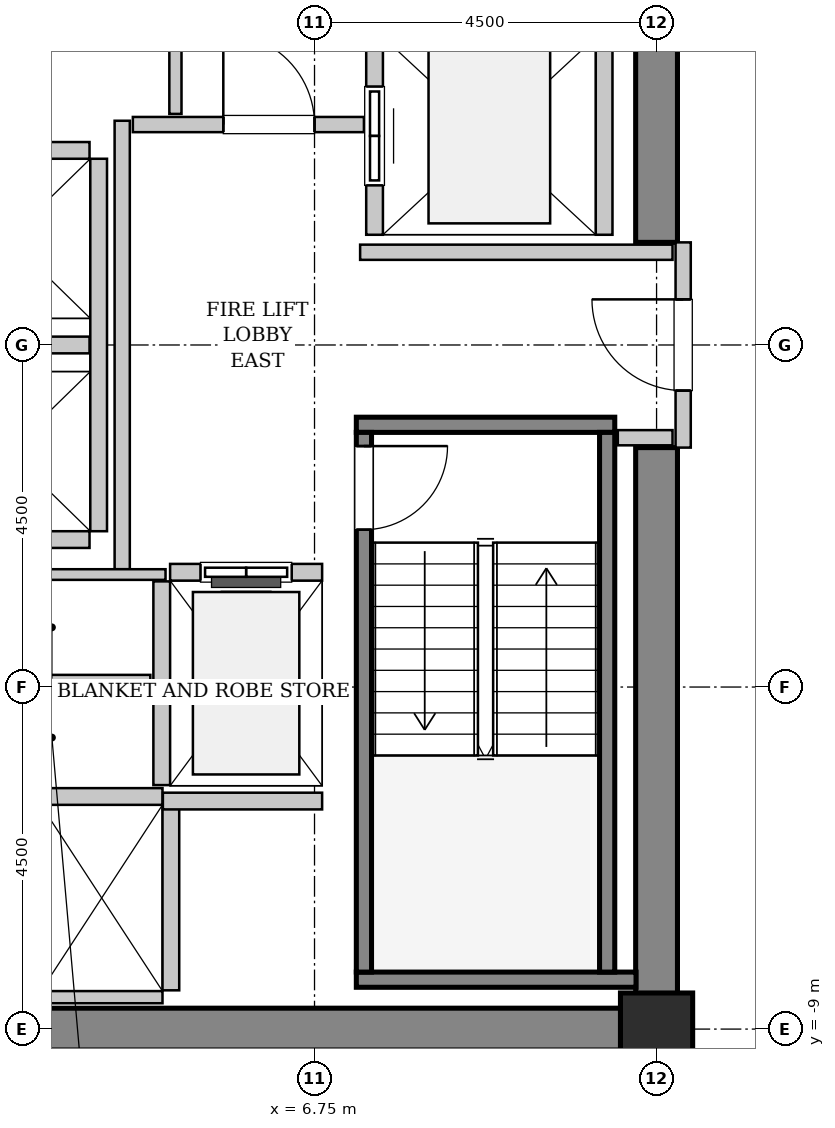
"""IFC4 building model, lengths in metres.
Left out: names, types, materials, properties, quantities, classifications, styles, units other than length and angle.
Written with IfcOpenShell. Run it as: python <this file> out.ifc"""

import sys

from ifc_helpers import new_model, si_unit, direction, frame, frame_2d, origin, origin_2d, place, context, subcontext, project, spatial, rectangle, hollow_rectangle, extrude, source, transform, mapped, element, fill, save


model = new_model("IFC4")
c1 = context("Model", 3, precision=1e-05, world=origin(), true_north=direction((0.0, 1.0)))
c2 = subcontext(c1, "Body", "Model", "MODEL_VIEW")
j1 = project(units=[si_unit("LENGTHUNIT", "METRE"), si_unit("PLANEANGLEUNIT", "RADIAN")], contexts=[c1])
p1 = place(None, origin())
s1 = spatial("IfcSite", under=j1, at=p1, CompositionType="ELEMENT")
p2 = place(p1, origin())
s2 = spatial("IfcBuilding", under=s1, at=p2, CompositionType="ELEMENT")
p3 = place(p2, frame((0.0, 0.0, 109.8)))
s3 = spatial("IfcBuildingStorey", under=s2, at=p3, CompositionType="ELEMENT", Elevation=109.8)
m1 = source(origin(), c2, "Body", "SweptSolid", [
    extrude(rectangle(XDim=9.975, YDim=0.55, at=frame_2d((4.987, 0.0))), origin(), (0.0, 0.0, 1.0), 3.8),
])
p4 = place(p3, frame((1.55, -9.0, 0.0), z_axis=(0.0, 0.0, 1.0), x_axis=(1.0, 0.0, 0.0)))
e1 = element("IfcWall", 1, at=p4, inside=s3, PredefinedType="SHEAR", context=c2, shape_type="MappedRepresentation", body=[
    mapped(m1, transform((0.0, 0.0, 0.0), x_axis=(1.0, 0.0, 0.0), y_axis=(0.0, 1.0, 0.0), z_axis=(0.0, 0.0, 1.0), scale=1.0)),
])
m2 = source(origin(), c2, "Body", "SweptSolid", [
    extrude(rectangle(XDim=7.375, YDim=0.55, at=frame_2d((3.688, 0.0))), origin(), (0.0, 0.0, 1.0), 3.8),
])
for number, where, z_axis, x_axis in (
    (2, (11.25, -8.725, 0.0), (0.0, 0.0, 1.0), (0.0, 1.0, 0.0)),
    (3, (11.25, 1.35, 0.0), (0.0, 0.0, 1.0), (0.0, 1.0, 0.0)),
):
    element("IfcWall", number, at=place(p3, frame(where, z_axis=z_axis, x_axis=x_axis)), inside=s3, PredefinedType="SHEAR", context=c2, shape_type="MappedRepresentation", body=[
        mapped(m2, transform((0.0, 0.0, 0.0), x_axis=(1.0, 0.0, 0.0), y_axis=(0.0, 1.0, 0.0), z_axis=(0.0, 0.0, 1.0), scale=1.0)),
    ])
m3 = source(origin(), c2, "Body", "SweptSolid", [
    extrude(hollow_rectangle(XDim=0.95, YDim=0.95, WallThickness=0.045, InnerFilletRadius=0.045, OuterFilletRadius=0.09, at=origin_2d()), origin(), (0.0, 0.0, 1.0), 3.8),
])
p5 = place(p3, frame((11.25, -9.0, 0.0), z_axis=(0.0, 0.0, 1.0), x_axis=(1.0, 0.0, 0.0)))
e4 = element("IfcColumn", 4, at=p5, inside=s3, PredefinedType="COLUMN", context=c2, shape_type="MappedRepresentation", body=[
    mapped(m3, transform((0.0, 0.0, 0.0), x_axis=(1.0, 0.0, 0.0), y_axis=(0.0, 1.0, 0.0), z_axis=(0.0, 0.0, 1.0), scale=1.0)),
])
m4 = source(origin(), c2, "Body", "SweptSolid", [
    extrude(rectangle(XDim=3.4, YDim=0.2, at=frame_2d((1.7, 0.0))), origin(), (0.0, 0.0, 1.0), 3.8),
])
p6 = place(p3, frame((7.3, -1.05, 0.0), z_axis=(0.0, 0.0, 1.0), x_axis=(1.0, 0.0, 0.0)))
e5 = element("IfcWall", 5, at=p6, inside=s3, PredefinedType="SOLIDWALL", context=c2, shape_type="MappedRepresentation", body=[
    mapped(m4, transform((0.0, 0.0, 0.0), x_axis=(1.0, 0.0, 0.0), y_axis=(0.0, 1.0, 0.0), z_axis=(0.0, 0.0, 1.0), scale=1.0)),
])
m5 = source(origin(), c2, "Body", "SweptSolid", [
    extrude(rectangle(XDim=3.68, YDim=0.2, at=frame_2d((1.84, 0.0))), origin(), (0.0, 0.0, 1.0), 3.8),
])
p7 = place(p3, frame((7.3, -8.35, 0.0), z_axis=(0.0, 0.0, 1.0), x_axis=(1.0, 0.0, 0.0)))
e6 = element("IfcWall", 6, at=p7, inside=s3, PredefinedType="SOLIDWALL", context=c2, shape_type="MappedRepresentation", body=[
    mapped(m5, transform((0.0, 0.0, 0.0), x_axis=(1.0, 0.0, 0.0), y_axis=(0.0, 1.0, 0.0), z_axis=(0.0, 0.0, 1.0), scale=1.0)),
])
m6 = source(origin(), c2, "Body", "SweptSolid", [
    extrude(rectangle(XDim=7.1, YDim=0.2, at=frame_2d((3.55, 0.0))), origin(), (0.0, 0.0, 1.0), 3.8),
])
p8 = place(p3, frame((7.4, -1.15, 0.0), z_axis=(0.0, 0.0, 1.0), x_axis=(0.0, -1.0, 0.0)))
e7 = element("IfcWall", 7, at=p8, inside=s3, PredefinedType="SOLIDWALL", context=c2, shape_type="MappedRepresentation", body=[
    mapped(m6, transform((0.0, 0.0, 0.0), x_axis=(1.0, 0.0, 0.0), y_axis=(0.0, 1.0, 0.0), z_axis=(0.0, 0.0, 1.0), scale=1.0)),
])
p9 = place(p8, frame((0.18, 0.0, 0.0)))
e8 = element("IfcOpeningElement", 8, at=p9, cuts=e7, PredefinedType="OPENING", context=c2, shape_type="SweptSolid", body=[
    extrude(rectangle(XDim=1.1, YDim=2.15, at=frame_2d((0.55, 1.075))), frame((0.0, 0.11, 0.0), z_axis=(0.0, -1.0, 0.0), x_axis=(1.0, 0.0, 0.0)), (0.0, 0.0, 1.0), 0.22),
])
p10 = place(p3, frame((10.6, -1.15, 0.0), z_axis=(0.0, 0.0, 1.0), x_axis=(0.0, -1.0, 0.0)))
e9 = element("IfcWall", 9, at=p10, inside=s3, PredefinedType="SOLIDWALL", context=c2, shape_type="MappedRepresentation", body=[
    mapped(m6, transform((0.0, 0.0, 0.0), x_axis=(1.0, 0.0, 0.0), y_axis=(0.0, 1.0, 0.0), z_axis=(0.0, 0.0, 1.0), scale=1.0)),
])
m7 = source(origin(), c2, "Body", "SweptSolid", [
    extrude(rectangle(XDim=2.0, YDim=0.22, at=frame_2d((1.0, 0.0))), origin(), (0.0, 0.0, 1.0), 3.535),
])
p11 = place(p3, frame((6.85, -2.99, 0.0), z_axis=(0.0, 0.0, 1.0), x_axis=(-1.0, 0.0, 0.0)))
e10 = element("IfcWall", 10, at=p11, inside=s3, PredefinedType="SOLIDWALL", context=c2, shape_type="MappedRepresentation", body=[
    mapped(m7, transform((0.0, 0.0, 0.0), x_axis=(1.0, 0.0, 0.0), y_axis=(0.0, 1.0, 0.0), z_axis=(0.0, 0.0, 1.0), scale=1.0)),
])
p12 = place(p11, frame((0.4, 0.0, 0.0)))
e11 = element("IfcOpeningElement", 11, at=p12, cuts=e10, PredefinedType="OPENING", context=c2, shape_type="SweptSolid", body=[
    extrude(rectangle(XDim=1.2, YDim=2.2, at=frame_2d((0.6, 1.1))), frame((0.0, 0.12, 0.0), z_axis=(0.0, -1.0, 0.0), x_axis=(1.0, 0.0, 0.0)), (0.0, 0.0, 1.0), 0.24),
])
m8 = source(origin(), c2, "Body", "SweptSolid", [
    extrude(rectangle(XDim=2.68, YDim=0.22, at=frame_2d((1.34, 0.0))), origin(), (0.0, 0.0, 1.0), 3.535),
])
p13 = place(p3, frame((4.74, -3.11, 0.0), z_axis=(0.0, 0.0, 1.0), x_axis=(0.0, -1.0, 0.0)))
e12 = element("IfcWall", 12, at=p13, inside=s3, PredefinedType="SOLIDWALL", context=c2, shape_type="MappedRepresentation", body=[
    mapped(m8, transform((0.0, 0.0, 0.0), x_axis=(1.0, 0.0, 0.0), y_axis=(0.0, 1.0, 0.0), z_axis=(0.0, 0.0, 1.0), scale=1.0)),
])
m9 = source(origin(), c2, "Body", "SweptSolid", [
    extrude(rectangle(XDim=5.45, YDim=0.22, at=frame_2d((2.725, 0.0))), origin(), (0.0, 0.0, 1.0), 3.535),
])
p14 = place(p3, frame((7.54, 6.9, 0.0), z_axis=(0.0, 0.0, 1.0), x_axis=(0.0, -1.0, 0.0)))
e13 = element("IfcWall", 13, at=p14, inside=s3, PredefinedType="SOLIDWALL", context=c2, shape_type="MappedRepresentation", body=[
    mapped(m9, transform((0.0, 0.0, 0.0), x_axis=(1.0, 0.0, 0.0), y_axis=(0.0, 1.0, 0.0), z_axis=(0.0, 0.0, 1.0), scale=1.0)),
])
p15 = place(p14, frame((3.5, 0.0, 0.0)))
e14 = element("IfcOpeningElement", 14, at=p15, cuts=e13, PredefinedType="OPENING", context=c2, shape_type="SweptSolid", body=[
    extrude(rectangle(XDim=1.3, YDim=2.3, at=frame_2d((0.65, 1.15))), frame((0.0, 0.12, 0.0), z_axis=(0.0, -1.0, 0.0), x_axis=(1.0, 0.0, 0.0)), (0.0, 0.0, 1.0), 0.24),
])
p16 = place(p14, frame((0.65, 0.0, 0.0)))
e15 = element("IfcOpeningElement", 15, at=p16, cuts=e13, PredefinedType="OPENING", context=c2, shape_type="SweptSolid", body=[
    extrude(rectangle(XDim=1.3, YDim=2.3, at=frame_2d((0.65, 1.15))), frame((0.0, 0.12, 0.0), z_axis=(0.0, -1.0, 0.0), x_axis=(1.0, 0.0, 0.0)), (0.0, 0.0, 1.0), 0.24),
])
p17 = place(p3, frame((10.56, 1.45, 0.0), z_axis=(0.0, 0.0, 1.0), x_axis=(0.0, 1.0, 0.0)))
e16 = element("IfcWall", 16, at=p17, inside=s3, PredefinedType="SOLIDWALL", context=c2, shape_type="MappedRepresentation", body=[
    mapped(m9, transform((0.0, 0.0, 0.0), x_axis=(1.0, 0.0, 0.0), y_axis=(0.0, 1.0, 0.0), z_axis=(0.0, 0.0, 1.0), scale=1.0)),
])
m10 = source(origin(), c2, "Body", "SweptSolid", [
    extrude(rectangle(XDim=3.2, YDim=0.22, at=frame_2d((1.6, 0.0))), origin(), (0.0, 0.0, 1.0), 3.535),
])
p18 = place(p3, frame((4.75, -5.94, 0.0), z_axis=(0.0, 0.0, 1.0), x_axis=(-1.0, 0.0, 0.0)))
e17 = element("IfcWall", 17, at=p18, inside=s3, PredefinedType="SOLIDWALL", context=c2, shape_type="MappedRepresentation", body=[
    mapped(m10, transform((0.0, 0.0, 0.0), x_axis=(1.0, 0.0, 0.0), y_axis=(0.0, 1.0, 0.0), z_axis=(0.0, 0.0, 1.0), scale=1.0)),
])
m11 = source(origin(), c2, "Body", "SweptSolid", [
    extrude(rectangle(XDim=3.2, YDim=0.16, at=frame_2d((1.6, 0.0))), origin(), (0.0, 0.0, 1.0), 2.425),
])
p19 = place(p3, frame((1.55, -8.58, 0.0), z_axis=(0.0, 0.0, 1.0), x_axis=(1.0, 0.0, 0.0)))
e18 = element("IfcWall", 18, at=p19, inside=s3, PredefinedType="PARTITIONING", context=c2, shape_type="MappedRepresentation", body=[
    mapped(m11, transform((0.0, 0.0, 0.0), x_axis=(1.0, 0.0, 0.0), y_axis=(0.0, 1.0, 0.0), z_axis=(0.0, 0.0, 1.0), scale=1.0)),
])
m12 = source(origin(), c2, "Body", "SweptSolid", [
    extrude(rectangle(XDim=2.43, YDim=0.22, at=frame_2d((1.215, 0.0))), origin(), (0.0, 0.0, 1.0), 3.535),
])
p20 = place(p3, frame((4.86, -8.49, 0.0), z_axis=(0.0, 0.0, 1.0), x_axis=(0.0, 1.0, 0.0)))
e19 = element("IfcWall", 19, at=p20, inside=s3, PredefinedType="SOLIDWALL", context=c2, shape_type="MappedRepresentation", body=[
    mapped(m12, transform((0.0, 0.0, 0.0), x_axis=(1.0, 0.0, 0.0), y_axis=(0.0, 1.0, 0.0), z_axis=(0.0, 0.0, 1.0), scale=1.0)),
])
m13 = source(origin(), c2, "Body", "SweptSolid", [
    extrude(rectangle(XDim=4.9, YDim=0.22, at=frame_2d((2.45, 0.0))), origin(), (0.0, 0.0, 1.0), 3.535),
])
p21 = place(p3, frame((3.91, -2.45, 0.0), z_axis=(0.0, 0.0, 1.0), x_axis=(0.0, 1.0, 0.0)))
e20 = element("IfcWall", 20, at=p21, inside=s3, PredefinedType="SOLIDWALL", context=c2, shape_type="MappedRepresentation", body=[
    mapped(m13, transform((0.0, 0.0, 0.0), x_axis=(1.0, 0.0, 0.0), y_axis=(0.0, 1.0, 0.0), z_axis=(0.0, 0.0, 1.0), scale=1.0)),
])
m14 = source(origin(), c2, "Body", "SweptSolid", [
    extrude(rectangle(XDim=2.13, YDim=0.22, at=frame_2d((1.065, 0.0))), origin(), (0.0, 0.0, 1.0), 3.535),
])
for number, where, z_axis, x_axis in (
    (21, (1.66, -2.56, 0.0), (0.0, 0.0, 1.0), (1.0, 0.0, 0.0)),
    (22, (1.66, 0.0, 0.0), (0.0, 0.0, 1.0), (1.0, 0.0, 0.0)),
    (23, (3.79, 2.56, 0.0), (0.0, 0.0, 1.0), (-1.0, 0.0, 0.0)),
):
    element("IfcWall", number, at=place(p3, frame(where, z_axis=z_axis, x_axis=x_axis)), inside=s3, PredefinedType="SOLIDWALL", context=c2, shape_type="MappedRepresentation", body=[
        mapped(m14, transform((0.0, 0.0, 0.0), x_axis=(1.0, 0.0, 0.0), y_axis=(0.0, 1.0, 0.0), z_axis=(0.0, 0.0, 1.0), scale=1.0)),
    ])
m15 = source(origin(), c2, "Body", "SweptSolid", [
    extrude(rectangle(XDim=2.095, YDim=0.22, at=frame_2d((1.048, 0.0))), origin(), (0.0, 0.0, 1.0), 3.535),
])
p22 = place(p3, frame((4.755, -6.0, 0.0), z_axis=(0.0, 0.0, 1.0), x_axis=(1.0, 0.0, 0.0)))
e24 = element("IfcWall", 24, at=p22, inside=s3, PredefinedType="SOLIDWALL", context=c2, shape_type="MappedRepresentation", body=[
    mapped(m15, transform((0.0, 0.0, 0.0), x_axis=(1.0, 0.0, 0.0), y_axis=(0.0, 1.0, 0.0), z_axis=(0.0, 0.0, 1.0), scale=1.0)),
])
m16 = source(origin(), c2, "Body", "SweptSolid", [
    extrude(rectangle(XDim=2.7, YDim=0.2, at=frame_2d((1.35, 0.0))), origin(), (0.0, 0.0, 1.0), 2.425),
])
p23 = place(p3, frame((11.6, -1.35, 0.0), z_axis=(0.0, 0.0, 1.0), x_axis=(0.0, 1.0, 0.0)))
e25 = element("IfcWall", 25, at=p23, inside=s3, PredefinedType="PARTITIONING", context=c2, shape_type="MappedRepresentation", body=[
    mapped(m16, transform((0.0, 0.0, 0.0), x_axis=(1.0, 0.0, 0.0), y_axis=(0.0, 1.0, 0.0), z_axis=(0.0, 0.0, 1.0), scale=1.0)),
])
p24 = place(p23, frame((0.75, 0.0, 0.0)))
e26 = element("IfcOpeningElement", 26, at=p24, cuts=e25, PredefinedType="OPENING", context=c2, shape_type="SweptSolid", body=[
    extrude(rectangle(XDim=1.2, YDim=2.15, at=frame_2d((0.6, 1.075))), frame((0.0, 0.11, 0.0), z_axis=(0.0, -1.0, 0.0), x_axis=(1.0, 0.0, 0.0)), (0.0, 0.0, 1.0), 0.22),
])
m17 = source(origin(), c2, "Body", "SweptSolid", [
    extrude(rectangle(XDim=5.9, YDim=0.2, at=frame_2d((2.95, 0.0))), origin(), (0.0, 0.0, 1.0), 3.535),
])
p25 = place(p3, frame((4.22, -2.95, 0.0), z_axis=(0.0, 0.0, 1.0), x_axis=(0.0, 1.0, 0.0)))
e27 = element("IfcWall", 27, at=p25, inside=s3, PredefinedType="PARTITIONING", context=c2, shape_type="MappedRepresentation", body=[
    mapped(m17, transform((0.0, 0.0, 0.0), x_axis=(1.0, 0.0, 0.0), y_axis=(0.0, 1.0, 0.0), z_axis=(0.0, 0.0, 1.0), scale=1.0)),
])
m18 = source(origin(), c2, "Body", "SweptSolid", [
    extrude(rectangle(XDim=3.04, YDim=0.2, at=frame_2d((1.52, 0.0))), origin(), (0.0, 0.0, 1.0), 3.535),
])
p26 = place(p3, frame((4.36, 2.9, 0.0), z_axis=(0.0, 0.0, 1.0), x_axis=(1.0, 0.0, 0.0)))
e28 = element("IfcWall", 28, at=p26, inside=s3, PredefinedType="PARTITIONING", context=c2, shape_type="MappedRepresentation", body=[
    mapped(m18, transform((0.0, 0.0, 0.0), x_axis=(1.0, 0.0, 0.0), y_axis=(0.0, 1.0, 0.0), z_axis=(0.0, 0.0, 1.0), scale=1.0)),
])
p27 = place(p26, frame((1.19, 0.0, 0.0)))
e29 = element("IfcOpeningElement", 29, at=p27, cuts=e28, PredefinedType="OPENING", context=c2, shape_type="SweptSolid", body=[
    extrude(rectangle(XDim=1.2, YDim=2.15, at=frame_2d((0.6, 1.075))), frame((0.0, 0.11, 0.0), z_axis=(0.0, -1.0, 0.0), x_axis=(1.0, 0.0, 0.0)), (0.0, 0.0, 1.0), 0.22),
])
m19 = source(origin(), c2, "Body", "SweptSolid", [
    extrude(rectangle(XDim=4.11, YDim=0.2, at=frame_2d((2.055, 0.0))), origin(), (0.0, 0.0, 1.0), 3.535),
])
p28 = place(p3, frame((7.35, 1.22, 0.0), z_axis=(0.0, 0.0, 1.0), x_axis=(1.0, 0.0, 0.0)))
e30 = element("IfcWall", 30, at=p28, inside=s3, PredefinedType="PARTITIONING", context=c2, shape_type="MappedRepresentation", body=[
    mapped(m19, transform((0.0, 0.0, 0.0), x_axis=(1.0, 0.0, 0.0), y_axis=(0.0, 1.0, 0.0), z_axis=(0.0, 0.0, 1.0), scale=1.0)),
])
m20 = source(origin(), c2, "Body", "SweptSolid", [
    extrude(rectangle(XDim=0.72, YDim=0.2, at=frame_2d((0.36, 0.0))), origin(), (0.0, 0.0, 1.0), 3.535),
])
p29 = place(p3, frame((10.74, -1.22, 0.0), z_axis=(0.0, 0.0, 1.0), x_axis=(1.0, 0.0, 0.0)))
e31 = element("IfcWall", 31, at=p29, inside=s3, PredefinedType="PARTITIONING", context=c2, shape_type="MappedRepresentation", body=[
    mapped(m20, transform((0.0, 0.0, 0.0), x_axis=(1.0, 0.0, 0.0), y_axis=(0.0, 1.0, 0.0), z_axis=(0.0, 0.0, 1.0), scale=1.0)),
])
m21 = source(origin(), c2, "Body", "SweptSolid", [
    extrude(rectangle(XDim=3.015, YDim=0.16, at=frame_2d((1.507, 0.0))), origin(), (0.0, 0.0, 1.0), 3.535),
])
p30 = place(p3, frame((4.92, 3.04, 0.0), z_axis=(0.0, 0.0, 1.0), x_axis=(0.0, 1.0, 0.0)))
e32 = element("IfcWall", 32, at=p30, inside=s3, PredefinedType="PARTITIONING", context=c2, shape_type="MappedRepresentation", body=[
    mapped(m21, transform((0.0, 0.0, 0.0), x_axis=(1.0, 0.0, 0.0), y_axis=(0.0, 1.0, 0.0), z_axis=(0.0, 0.0, 1.0), scale=1.0)),
])
m22 = source(origin(), c2, "Body", "SweptSolid", [
    extrude(rectangle(XDim=3.15, YDim=0.14, at=frame_2d((1.575, 0.0))), origin(), (0.0, 0.0, 1.0), 3.535),
])
p31 = place(p3, frame((1.64, -3.02, 0.0), z_axis=(0.0, 0.0, 1.0), x_axis=(1.0, 0.0, 0.0)))
e33 = element("IfcWall", 33, at=p31, inside=s3, PredefinedType="PARTITIONING", context=c2, shape_type="MappedRepresentation", body=[
    mapped(m22, transform((0.0, 0.0, 0.0), x_axis=(1.0, 0.0, 0.0), y_axis=(0.0, 1.0, 0.0), z_axis=(0.0, 0.0, 1.0), scale=1.0)),
])
m23 = source(origin(), c2, "Body", "SweptSolid", [
    extrude(rectangle(XDim=2.95, YDim=0.14, at=frame_2d((1.475, 0.0))), origin(), (0.0, 0.0, 1.0), 3.535),
])
p32 = place(p3, frame((1.64, -4.41, 0.0), z_axis=(0.0, 0.0, 1.0), x_axis=(1.0, 0.0, 0.0)))
e34 = element("IfcWall", 34, at=p32, inside=s3, PredefinedType="PARTITIONING", context=c2, shape_type="MappedRepresentation", body=[
    mapped(m23, transform((0.0, 0.0, 0.0), x_axis=(1.0, 0.0, 0.0), y_axis=(0.0, 1.0, 0.0), z_axis=(0.0, 0.0, 1.0), scale=1.0)),
])
m24 = source(origin(), c2, "Body", "SweptSolid", [
    extrude(rectangle(XDim=1.1, YDim=2.15, at=frame_2d((0.55, 1.075))), frame((0.0, 0.025, 0.0), z_axis=(0.0, -1.0, 0.0), x_axis=(1.0, 0.0, 0.0)), (0.0, 0.0, 1.0), 0.05),
])
p33 = place(p9, origin())
e35 = element("IfcDoor", 35, at=p33, inside=s3, OperationType="SINGLE_SWING_LEFT", PredefinedType="DOOR", context=c2, shape_type="MappedRepresentation", body=[
    mapped(m24, transform((0.0, 0.0, 0.0), x_axis=(1.0, 0.0, 0.0), y_axis=(0.0, 1.0, 0.0), z_axis=(0.0, 0.0, 1.0), scale=1.0)),
])
fill(e8, e35)
m25 = source(origin(), c2, "Body", "SweptSolid", [
    extrude(rectangle(XDim=1.2, YDim=2.2, at=frame_2d((0.6, 1.1))), frame((0.0, 0.025, 0.0), z_axis=(0.0, -1.0, 0.0), x_axis=(1.0, 0.0, 0.0)), (0.0, 0.0, 1.0), 0.05),
])
p34 = place(p12, origin())
e36 = element("IfcDoor", 36, at=p34, inside=s3, OperationType="SLIDING_TO_LEFT", PredefinedType="DOOR", context=c2, shape_type="MappedRepresentation", body=[
    mapped(m25, transform((0.0, 0.0, 0.0), x_axis=(1.0, 0.0, 0.0), y_axis=(0.0, 1.0, 0.0), z_axis=(0.0, 0.0, 1.0), scale=1.0)),
])
fill(e11, e36)
m26 = source(origin(), c2, "Body", "SweptSolid", [
    extrude(rectangle(XDim=1.3, YDim=2.3, at=frame_2d((0.65, 1.15))), frame((0.0, 0.025, 0.0), z_axis=(0.0, -1.0, 0.0), x_axis=(1.0, 0.0, 0.0)), (0.0, 0.0, 1.0), 0.05),
])
p35 = place(p15, origin())
e37 = element("IfcDoor", 37, at=p35, inside=s3, OperationType="SLIDING_TO_RIGHT", PredefinedType="DOOR", context=c2, shape_type="MappedRepresentation", body=[
    mapped(m26, transform((0.0, 0.0, 0.0), x_axis=(1.0, 0.0, 0.0), y_axis=(0.0, 1.0, 0.0), z_axis=(0.0, 0.0, 1.0), scale=1.0)),
])
fill(e14, e37)
m27 = source(origin(), c2, "Body", "SweptSolid", [
    extrude(rectangle(XDim=1.2, YDim=2.15, at=frame_2d((0.6, 1.075))), frame((0.0, 0.025, 0.0), z_axis=(0.0, -1.0, 0.0), x_axis=(1.0, 0.0, 0.0)), (0.0, 0.0, 1.0), 0.05),
])
p36 = place(p24, origin())
e38 = element("IfcDoor", 38, at=p36, inside=s3, OperationType="SINGLE_SWING_RIGHT", PredefinedType="DOOR", context=c2, shape_type="MappedRepresentation", body=[
    mapped(m27, transform((0.0, 0.0, 0.0), x_axis=(1.0, 0.0, 0.0), y_axis=(0.0, 1.0, 0.0), z_axis=(0.0, 0.0, 1.0), scale=1.0)),
])
fill(e26, e38)
p37 = place(p27, origin())
e39 = element("IfcDoor", 39, at=p37, inside=s3, OperationType="SINGLE_SWING_LEFT", PredefinedType="DOOR", context=c2, shape_type="MappedRepresentation", body=[
    mapped(m27, transform((0.0, 0.0, 0.0), x_axis=(1.0, 0.0, 0.0), y_axis=(0.0, 1.0, 0.0), z_axis=(0.0, 0.0, 1.0), scale=1.0)),
])
fill(e29, e39)
save(model, sys.argv[1])
